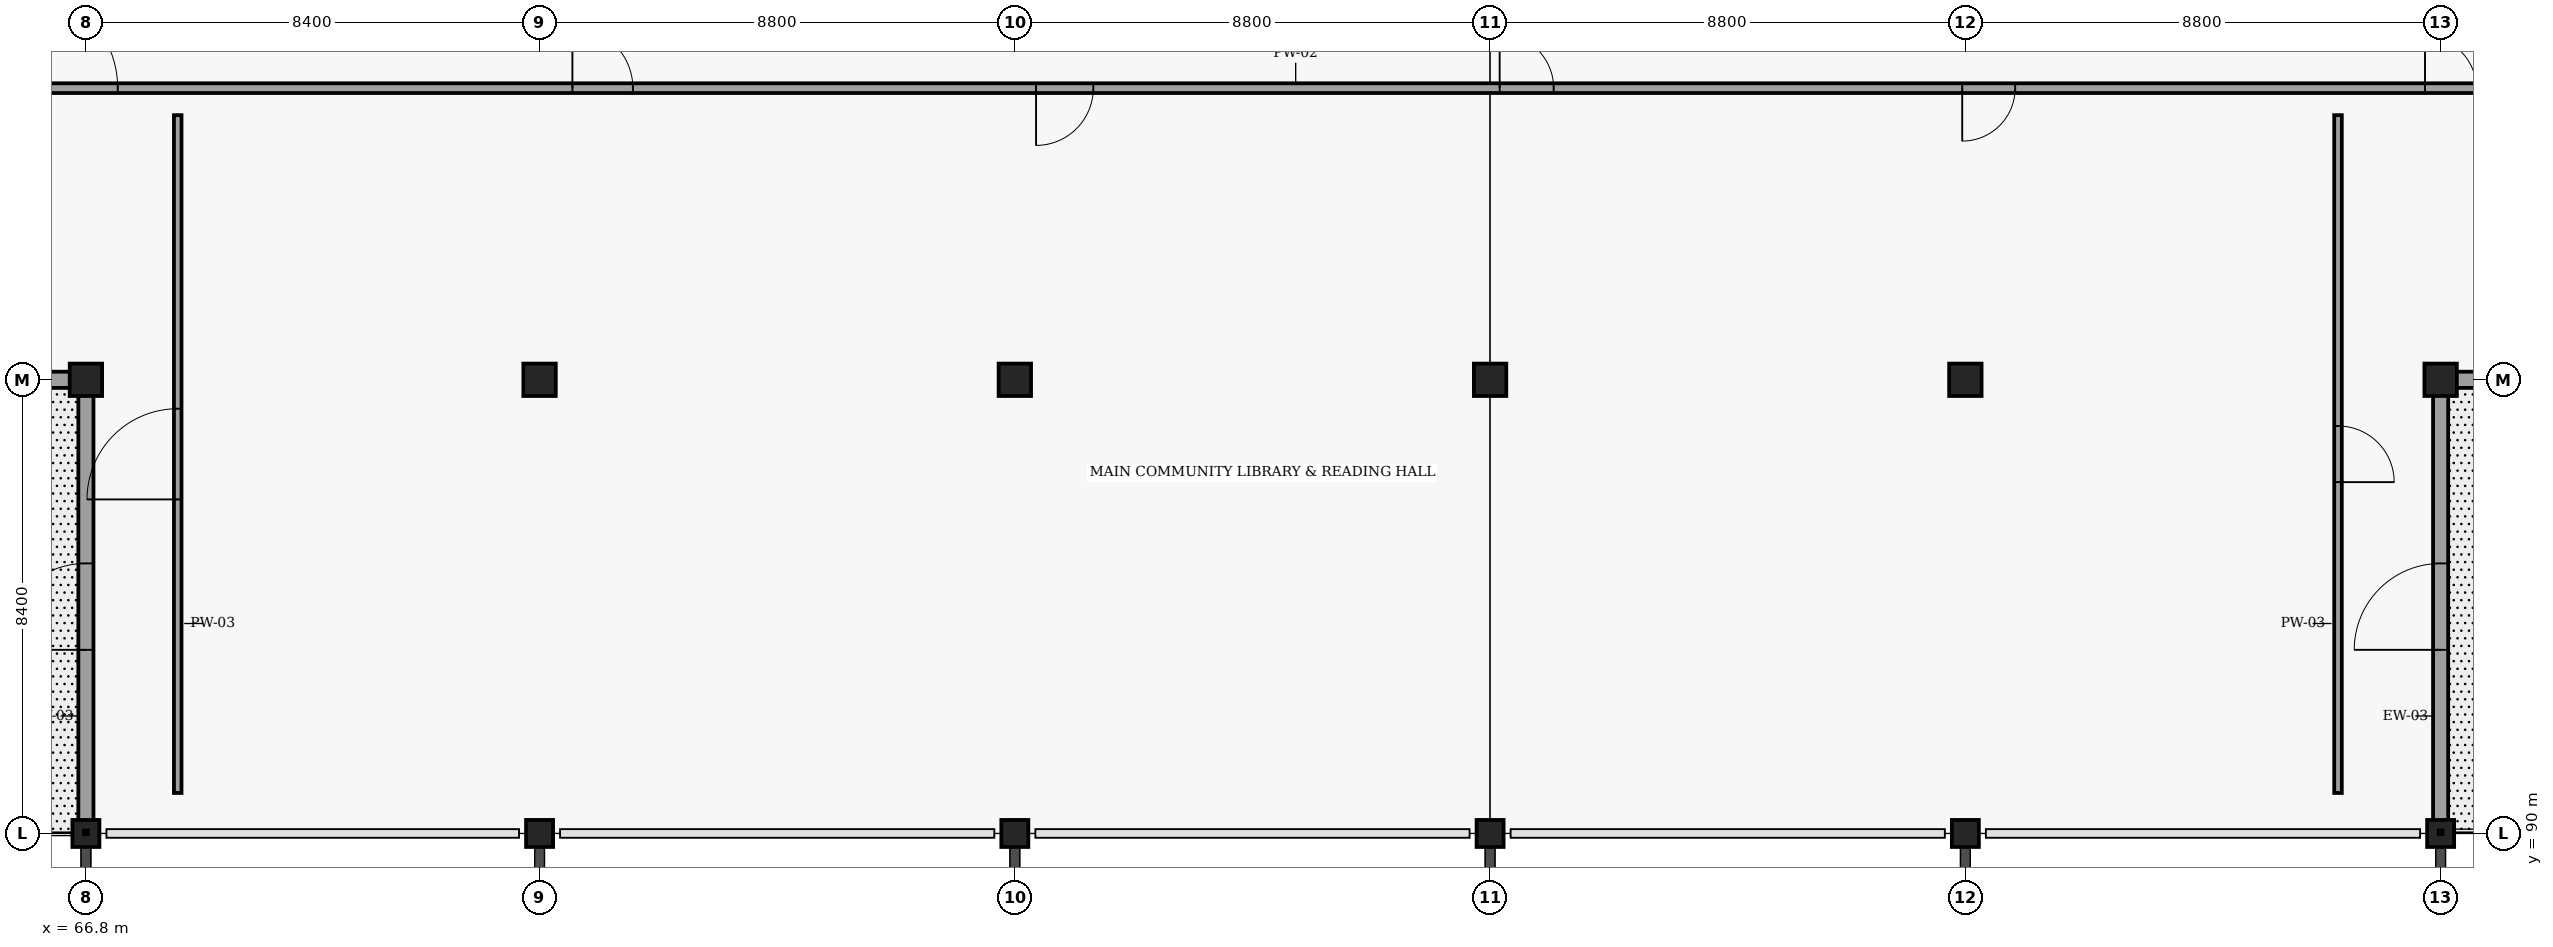
"""IFC4 building model, lengths in metres.
Left out: names, types, materials, properties, quantities, classifications, styles, units other than length and angle.
Written with IfcOpenShell. Run it as: python <this file> out.ifc"""

import sys

from ifc_helpers import new_model, si_unit, direction, frame, frame_2d, origin, origin_2d, place, context, subcontext, project, spatial, rectangle, extrude, element, fill, save


model = new_model("IFC4")
c1 = context("Model", 3, precision=1e-05, world=origin(), true_north=direction((0.0, 1.0)))
c2 = subcontext(c1, "Body", "Model", "MODEL_VIEW")
j1 = project(units=[si_unit("LENGTHUNIT", "METRE"), si_unit("PLANEANGLEUNIT", "RADIAN")], contexts=[c1])
p1 = place(None, origin())
s1 = spatial("IfcSite", under=j1, at=p1, CompositionType="ELEMENT")
p2 = place(p1, origin())
s2 = spatial("IfcBuilding", under=s1, at=p2, CompositionType="ELEMENT")
p3 = place(p2, frame((0.0, 0.0, 12.9)))
s3 = spatial("IfcBuildingStorey", under=s2, at=p3, CompositionType="ELEMENT", Elevation=12.9)
p4 = place(p3, frame((66.8, 90.0, 0.0), z_axis=(0.0, 0.0, 1.0), x_axis=(1.0, 0.0, 0.0)))
e1 = element("IfcColumn", 1, at=p4, inside=s3, PredefinedType="COLUMN", context=c2, shape_type="SweptSolid", body=[
    extrude(rectangle(XDim=0.5, YDim=0.5, at=origin_2d()), origin(), (0.0, 0.0, 1.0), 3.6),
])
p5 = place(p3, frame((66.8, 98.4, 0.0), z_axis=(0.0, 0.0, 1.0), x_axis=(1.0, 0.0, 0.0)))
e2 = element("IfcColumn", 2, at=p5, inside=s3, PredefinedType="COLUMN", context=c2, shape_type="SweptSolid", body=[
    extrude(rectangle(XDim=0.6, YDim=0.6, at=origin_2d()), origin(), (0.0, 0.0, 1.0), 3.6),
])
p6 = place(p3, frame((75.2, 90.0, 0.0), z_axis=(0.0, 0.0, 1.0), x_axis=(1.0, 0.0, 0.0)))
e3 = element("IfcColumn", 3, at=p6, inside=s3, PredefinedType="COLUMN", context=c2, shape_type="SweptSolid", body=[
    extrude(rectangle(XDim=0.5, YDim=0.5, at=origin_2d()), origin(), (0.0, 0.0, 1.0), 3.6),
])
p7 = place(p3, frame((75.2, 98.4, 0.0), z_axis=(0.0, 0.0, 1.0), x_axis=(1.0, 0.0, 0.0)))
e4 = element("IfcColumn", 4, at=p7, inside=s3, PredefinedType="COLUMN", context=c2, shape_type="SweptSolid", body=[
    extrude(rectangle(XDim=0.6, YDim=0.6, at=origin_2d()), origin(), (0.0, 0.0, 1.0), 3.6),
])
p8 = place(p3, frame((84.0, 90.0, 0.0), z_axis=(0.0, 0.0, 1.0), x_axis=(1.0, 0.0, 0.0)))
e5 = element("IfcColumn", 5, at=p8, inside=s3, PredefinedType="COLUMN", context=c2, shape_type="SweptSolid", body=[
    extrude(rectangle(XDim=0.5, YDim=0.5, at=origin_2d()), origin(), (0.0, 0.0, 1.0), 3.6),
])
p9 = place(p3, frame((84.0, 98.4, 0.0), z_axis=(0.0, 0.0, 1.0), x_axis=(1.0, 0.0, 0.0)))
e6 = element("IfcColumn", 6, at=p9, inside=s3, PredefinedType="COLUMN", context=c2, shape_type="SweptSolid", body=[
    extrude(rectangle(XDim=0.6, YDim=0.6, at=origin_2d()), origin(), (0.0, 0.0, 1.0), 3.6),
])
p10 = place(p3, frame((92.8, 90.0, 0.0), z_axis=(0.0, 0.0, 1.0), x_axis=(1.0, 0.0, 0.0)))
e7 = element("IfcColumn", 7, at=p10, inside=s3, PredefinedType="COLUMN", context=c2, shape_type="SweptSolid", body=[
    extrude(rectangle(XDim=0.5, YDim=0.5, at=origin_2d()), origin(), (0.0, 0.0, 1.0), 3.6),
])
p11 = place(p3, frame((92.8, 98.4, 0.0), z_axis=(0.0, 0.0, 1.0), x_axis=(1.0, 0.0, 0.0)))
e8 = element("IfcColumn", 8, at=p11, inside=s3, PredefinedType="COLUMN", context=c2, shape_type="SweptSolid", body=[
    extrude(rectangle(XDim=0.6, YDim=0.6, at=origin_2d()), origin(), (0.0, 0.0, 1.0), 3.6),
])
p12 = place(p3, frame((101.6, 90.0, 0.0), z_axis=(0.0, 0.0, 1.0), x_axis=(1.0, 0.0, 0.0)))
e9 = element("IfcColumn", 9, at=p12, inside=s3, PredefinedType="COLUMN", context=c2, shape_type="SweptSolid", body=[
    extrude(rectangle(XDim=0.5, YDim=0.5, at=origin_2d()), origin(), (0.0, 0.0, 1.0), 3.6),
])
p13 = place(p3, frame((101.6, 98.4, 0.0), z_axis=(0.0, 0.0, 1.0), x_axis=(1.0, 0.0, 0.0)))
e10 = element("IfcColumn", 10, at=p13, inside=s3, PredefinedType="COLUMN", context=c2, shape_type="SweptSolid", body=[
    extrude(rectangle(XDim=0.6, YDim=0.6, at=origin_2d()), origin(), (0.0, 0.0, 1.0), 3.6),
])
p14 = place(p3, frame((110.4, 90.0, 0.0), z_axis=(0.0, 0.0, 1.0), x_axis=(1.0, 0.0, 0.0)))
e11 = element("IfcColumn", 11, at=p14, inside=s3, PredefinedType="COLUMN", context=c2, shape_type="SweptSolid", body=[
    extrude(rectangle(XDim=0.5, YDim=0.5, at=origin_2d()), origin(), (0.0, 0.0, 1.0), 3.6),
])
p15 = place(p3, frame((110.4, 98.4, 0.0), z_axis=(0.0, 0.0, 1.0), x_axis=(1.0, 0.0, 0.0)))
e12 = element("IfcColumn", 12, at=p15, inside=s3, PredefinedType="COLUMN", context=c2, shape_type="SweptSolid", body=[
    extrude(rectangle(XDim=0.6, YDim=0.6, at=origin_2d()), origin(), (0.0, 0.0, 1.0), 3.6),
])
p16 = place(p3, frame((58.5, 98.4, 0.0), z_axis=(0.0, 0.0, 1.0), x_axis=(1.0, 0.0, 0.0)))
e13 = element("IfcWall", 13, at=p16, inside=s3, PredefinedType="SOLIDWALL", context=c2, shape_type="SweptSolid", body=[
    extrude(rectangle(XDim=8.2, YDim=0.3, at=frame_2d((4.1, 0.0))), origin(), (0.0, 0.0, 1.0), 2.885),
])
p17 = place(p3, frame((110.5, 98.4, 0.0), z_axis=(0.0, 0.0, 1.0), x_axis=(1.0, 0.0, 0.0)))
e14 = element("IfcWall", 14, at=p17, inside=s3, PredefinedType="SOLIDWALL", context=c2, shape_type="SweptSolid", body=[
    extrude(rectangle(XDim=8.6, YDim=0.3, at=frame_2d((4.3, 0.0))), origin(), (0.0, 0.0, 1.0), 2.885),
])
p18 = place(p3, frame((66.8, 90.15, 0.0), z_axis=(0.0, 0.0, 1.0), x_axis=(0.0, 1.0, 0.0)))
e15 = element("IfcWall", 15, at=p18, inside=s3, PredefinedType="SOLIDWALL", context=c2, shape_type="SweptSolid", body=[
    extrude(rectangle(XDim=8.1, YDim=0.28, at=frame_2d((4.05, 0.0))), origin(), (0.0, 0.0, 1.0), 2.915),
])
p19 = place(p18, frame((3.25, 0.0, 0.0)))
e16 = element("IfcOpeningElement", 16, at=p19, cuts=e15, PredefinedType="OPENING", context=c2, shape_type="SweptSolid", body=[
    extrude(rectangle(XDim=1.6, YDim=2.2, at=frame_2d((0.8, 1.1))), frame((0.0, 0.15, 0.0), z_axis=(0.0, -1.0, 0.0), x_axis=(1.0, 0.0, 0.0)), (0.0, 0.0, 1.0), 0.3),
])
p20 = place(p3, frame((110.4, 90.15, 0.0), z_axis=(0.0, 0.0, 1.0), x_axis=(0.0, 1.0, 0.0)))
e17 = element("IfcWall", 17, at=p20, inside=s3, PredefinedType="SOLIDWALL", context=c2, shape_type="SweptSolid", body=[
    extrude(rectangle(XDim=8.1, YDim=0.28, at=frame_2d((4.05, 0.0))), origin(), (0.0, 0.0, 1.0), 2.915),
])
p21 = place(p20, frame((3.25, 0.0, 0.0)))
e18 = element("IfcOpeningElement", 18, at=p21, cuts=e17, PredefinedType="OPENING", context=c2, shape_type="SweptSolid", body=[
    extrude(rectangle(XDim=1.6, YDim=2.2, at=frame_2d((0.8, 1.1))), frame((0.0, 0.15, 0.0), z_axis=(0.0, -1.0, 0.0), x_axis=(1.0, 0.0, 0.0)), (0.0, 0.0, 1.0), 0.3),
])
p22 = place(p3, frame((42.15, 103.8, 0.0), z_axis=(0.0, 0.0, 1.0), x_axis=(1.0, 0.0, 0.0)))
e19 = element("IfcWall", 19, at=p22, inside=s3, PredefinedType="PARTITIONING", context=c2, shape_type="SweptSolid", body=[
    extrude(rectangle(XDim=94.1, YDim=0.18, at=frame_2d((47.05, 0.0))), origin(), (0.0, 0.0, 1.0), 2.715),
])
p23 = place(p22, frame((8.035, 0.0, 0.0)))
e20 = element("IfcOpeningElement", 20, at=p23, cuts=e19, PredefinedType="OPENING", context=c2, shape_type="SweptSolid", body=[
    extrude(rectangle(XDim=1.04, YDim=2.08, at=frame_2d((0.52, 1.04))), frame((0.0, 0.1, 0.0), z_axis=(0.0, -1.0, 0.0), x_axis=(1.0, 0.0, 0.0)), (0.0, 0.0, 1.0), 0.2),
])
p24 = place(p22, frame((16.109, 0.0, 0.0)))
e21 = element("IfcOpeningElement", 21, at=p24, cuts=e19, PredefinedType="OPENING", context=c2, shape_type="SweptSolid", body=[
    extrude(rectangle(XDim=2.0, YDim=2.3, at=frame_2d((1.0, 1.15))), frame((0.0, 0.1, 0.0), z_axis=(0.0, -1.0, 0.0), x_axis=(1.0, 0.0, 0.0)), (0.0, 0.0, 1.0), 0.2),
])
p25 = place(p22, frame((23.389, 0.0, 0.0)))
e22 = element("IfcOpeningElement", 22, at=p25, cuts=e19, PredefinedType="OPENING", context=c2, shape_type="SweptSolid", body=[
    extrude(rectangle(XDim=1.85, YDim=2.22, at=frame_2d((0.925, 1.11))), frame((0.0, 0.1, 0.0), z_axis=(0.0, -1.0, 0.0), x_axis=(1.0, 0.0, 0.0)), (0.0, 0.0, 1.0), 0.2),
])
p26 = place(p22, frame((33.658, 0.0, 0.0)))
e23 = element("IfcOpeningElement", 23, at=p26, cuts=e19, PredefinedType="OPENING", context=c2, shape_type="SweptSolid", body=[
    extrude(rectangle(XDim=1.12, YDim=2.16, at=frame_2d((0.56, 1.08))), frame((0.0, 0.1, 0.0), z_axis=(0.0, -1.0, 0.0), x_axis=(1.0, 0.0, 0.0)), (0.0, 0.0, 1.0), 0.2),
])
p27 = place(p22, frame((42.243, 0.0, 0.0)))
e24 = element("IfcOpeningElement", 24, at=p27, cuts=e19, PredefinedType="OPENING", context=c2, shape_type="SweptSolid", body=[
    extrude(rectangle(XDim=1.06, YDim=2.16, at=frame_2d((0.53, 1.08))), frame((0.0, 0.1, 0.0), z_axis=(0.0, -1.0, 0.0), x_axis=(1.0, 0.0, 0.0)), (0.0, 0.0, 1.0), 0.2),
])
p28 = place(p22, frame((50.827, 0.0, 0.0)))
e25 = element("IfcOpeningElement", 25, at=p28, cuts=e19, PredefinedType="OPENING", context=c2, shape_type="SweptSolid", body=[
    extrude(rectangle(XDim=1.0, YDim=2.14, at=frame_2d((0.5, 1.07))), frame((0.0, 0.1, 0.0), z_axis=(0.0, -1.0, 0.0), x_axis=(1.0, 0.0, 0.0)), (0.0, 0.0, 1.0), 0.2),
])
p29 = place(p22, frame((59.392, 0.0, 0.0)))
e26 = element("IfcOpeningElement", 26, at=p29, cuts=e19, PredefinedType="OPENING", context=c2, shape_type="SweptSolid", body=[
    extrude(rectangle(XDim=0.98, YDim=2.12, at=frame_2d((0.49, 1.06))), frame((0.0, 0.1, 0.0), z_axis=(0.0, -1.0, 0.0), x_axis=(1.0, 0.0, 0.0)), (0.0, 0.0, 1.0), 0.2),
])
p30 = place(p22, frame((67.961, 0.0, 0.0)))
e27 = element("IfcOpeningElement", 27, at=p30, cuts=e19, PredefinedType="OPENING", context=c2, shape_type="SweptSolid", body=[
    extrude(rectangle(XDim=0.95, YDim=2.12, at=frame_2d((0.475, 1.06))), frame((0.0, 0.1, 0.0), z_axis=(0.0, -1.0, 0.0), x_axis=(1.0, 0.0, 0.0)), (0.0, 0.0, 1.0), 0.2),
])
p31 = place(p22, frame((76.531, 0.0, 0.0)))
e28 = element("IfcOpeningElement", 28, at=p31, cuts=e19, PredefinedType="OPENING", context=c2, shape_type="SweptSolid", body=[
    extrude(rectangle(XDim=0.92, YDim=2.1, at=frame_2d((0.46, 1.05))), frame((0.0, 0.1, 0.0), z_axis=(0.0, -1.0, 0.0), x_axis=(1.0, 0.0, 0.0)), (0.0, 0.0, 1.0), 0.2),
])
p32 = place(p22, frame((85.065, 0.0, 0.0)))
e29 = element("IfcOpeningElement", 29, at=p32, cuts=e19, PredefinedType="OPENING", context=c2, shape_type="SweptSolid", body=[
    extrude(rectangle(XDim=0.96, YDim=2.08, at=frame_2d((0.48, 1.04))), frame((0.0, 0.1, 0.0), z_axis=(0.0, -1.0, 0.0), x_axis=(1.0, 0.0, 0.0)), (0.0, 0.0, 1.0), 0.2),
])
p33 = place(p3, frame((68.5, 90.75, 0.0), z_axis=(0.0, 0.0, 1.0), x_axis=(0.0, 1.0, 0.0)))
e30 = element("IfcWall", 30, at=p33, inside=s3, PredefinedType="PARTITIONING", context=c2, shape_type="SweptSolid", body=[
    extrude(rectangle(XDim=12.55, YDim=0.14, at=frame_2d((6.275, 0.0))), origin(), (0.0, 0.0, 1.0), 2.885),
])
p34 = place(p33, frame((5.435, 0.0, 0.0)))
e31 = element("IfcOpeningElement", 31, at=p34, cuts=e30, PredefinedType="OPENING", context=c2, shape_type="SweptSolid", body=[
    extrude(rectangle(XDim=1.68, YDim=2.26, at=frame_2d((0.84, 1.13))), frame((0.0, 0.08, 0.0), z_axis=(0.0, -1.0, 0.0), x_axis=(1.0, 0.0, 0.0)), (0.0, 0.0, 1.0), 0.16),
])
p35 = place(p3, frame((108.5, 90.75, 0.0), z_axis=(0.0, 0.0, 1.0), x_axis=(0.0, 1.0, 0.0)))
e32 = element("IfcWall", 32, at=p35, inside=s3, PredefinedType="PARTITIONING", context=c2, shape_type="SweptSolid", body=[
    extrude(rectangle(XDim=12.55, YDim=0.14, at=frame_2d((6.275, 0.0))), origin(), (0.0, 0.0, 1.0), 2.885),
])
p36 = place(p35, frame((5.755, 0.0, 0.0)))
e33 = element("IfcOpeningElement", 33, at=p36, cuts=e32, PredefinedType="OPENING", context=c2, shape_type="SweptSolid", body=[
    extrude(rectangle(XDim=1.04, YDim=2.08, at=frame_2d((0.52, 1.04))), frame((0.0, 0.08, 0.0), z_axis=(0.0, -1.0, 0.0), x_axis=(1.0, 0.0, 0.0)), (0.0, 0.0, 1.0), 0.16),
])
p37 = place(p19, origin())
e34 = element("IfcDoor", 34, at=p37, inside=s3, OperationType="DOUBLE_DOOR_SINGLE_SWING", PredefinedType="DOOR", context=c2, shape_type="SweptSolid", body=[
    extrude(rectangle(XDim=1.6, YDim=2.2, at=frame_2d((0.8, 1.1))), frame((0.0, 0.025, 0.0), z_axis=(0.0, -1.0, 0.0), x_axis=(1.0, 0.0, 0.0)), (0.0, 0.0, 1.0), 0.05),
])
fill(e16, e34)
p38 = place(p21, origin())
e35 = element("IfcDoor", 35, at=p38, inside=s3, OperationType="DOUBLE_DOOR_SINGLE_SWING", PredefinedType="DOOR", context=c2, shape_type="SweptSolid", body=[
    extrude(rectangle(XDim=1.6, YDim=2.2, at=frame_2d((0.8, 1.1))), frame((0.0, 0.025, 0.0), z_axis=(0.0, -1.0, 0.0), x_axis=(1.0, 0.0, 0.0)), (0.0, 0.0, 1.0), 0.05),
])
fill(e18, e35)
p39 = place(p25, origin())
e36 = element("IfcDoor", 36, at=p39, inside=s3, OperationType="DOUBLE_DOOR_SINGLE_SWING", PredefinedType="DOOR", context=c2, shape_type="SweptSolid", body=[
    extrude(rectangle(XDim=1.85, YDim=2.22, at=frame_2d((0.925, 1.11))), frame((0.0, 0.025, 0.0), z_axis=(0.0, -1.0, 0.0), x_axis=(1.0, 0.0, 0.0)), (0.0, 0.0, 1.0), 0.05),
])
fill(e22, e36)
p40 = place(p26, origin())
e37 = element("IfcDoor", 37, at=p40, inside=s3, OperationType="SINGLE_SWING_LEFT", PredefinedType="DOOR", context=c2, shape_type="SweptSolid", body=[
    extrude(rectangle(XDim=1.12, YDim=2.16, at=frame_2d((0.56, 1.08))), frame((0.0, 0.025, 0.0), z_axis=(0.0, -1.0, 0.0), x_axis=(1.0, 0.0, 0.0)), (0.0, 0.0, 1.0), 0.05),
])
fill(e23, e37)
p41 = place(p27, origin())
e38 = element("IfcDoor", 38, at=p41, inside=s3, OperationType="SINGLE_SWING_RIGHT", PredefinedType="DOOR", context=c2, shape_type="SweptSolid", body=[
    extrude(rectangle(XDim=1.06, YDim=2.16, at=frame_2d((0.53, 1.08))), frame((0.0, 0.025, 0.0), z_axis=(0.0, -1.0, 0.0), x_axis=(1.0, 0.0, 0.0)), (0.0, 0.0, 1.0), 0.05),
])
fill(e24, e38)
p42 = place(p28, origin())
e39 = element("IfcDoor", 39, at=p42, inside=s3, OperationType="SINGLE_SWING_LEFT", PredefinedType="DOOR", context=c2, shape_type="SweptSolid", body=[
    extrude(rectangle(XDim=1.0, YDim=2.14, at=frame_2d((0.5, 1.07))), frame((0.0, 0.025, 0.0), z_axis=(0.0, -1.0, 0.0), x_axis=(1.0, 0.0, 0.0)), (0.0, 0.0, 1.0), 0.05),
])
fill(e25, e39)
p43 = place(p29, origin())
e40 = element("IfcDoor", 40, at=p43, inside=s3, OperationType="SINGLE_SWING_RIGHT", PredefinedType="DOOR", context=c2, shape_type="SweptSolid", body=[
    extrude(rectangle(XDim=0.98, YDim=2.12, at=frame_2d((0.49, 1.06))), frame((0.0, 0.025, 0.0), z_axis=(0.0, -1.0, 0.0), x_axis=(1.0, 0.0, 0.0)), (0.0, 0.0, 1.0), 0.05),
])
fill(e26, e40)
p44 = place(p30, origin())
e41 = element("IfcDoor", 41, at=p44, inside=s3, OperationType="SINGLE_SWING_LEFT", PredefinedType="DOOR", context=c2, shape_type="SweptSolid", body=[
    extrude(rectangle(XDim=0.95, YDim=2.12, at=frame_2d((0.475, 1.06))), frame((0.0, 0.025, 0.0), z_axis=(0.0, -1.0, 0.0), x_axis=(1.0, 0.0, 0.0)), (0.0, 0.0, 1.0), 0.05),
])
fill(e27, e41)
p45 = place(p34, origin())
e42 = element("IfcDoor", 42, at=p45, inside=s3, OperationType="DOUBLE_DOOR_SINGLE_SWING", PredefinedType="DOOR", context=c2, shape_type="SweptSolid", body=[
    extrude(rectangle(XDim=1.68, YDim=2.26, at=frame_2d((0.84, 1.13))), frame((0.0, 0.025, 0.0), z_axis=(0.0, -1.0, 0.0), x_axis=(1.0, 0.0, 0.0)), (0.0, 0.0, 1.0), 0.05),
])
fill(e31, e42)
p46 = place(p36, origin())
e43 = element("IfcDoor", 43, at=p46, inside=s3, OperationType="SINGLE_SWING_RIGHT", PredefinedType="DOOR", context=c2, shape_type="SweptSolid", body=[
    extrude(rectangle(XDim=1.04, YDim=2.08, at=frame_2d((0.52, 1.04))), frame((0.0, 0.025, 0.0), z_axis=(0.0, -1.0, 0.0), x_axis=(1.0, 0.0, 0.0)), (0.0, 0.0, 1.0), 0.05),
])
fill(e33, e43)
save(model, sys.argv[1])
